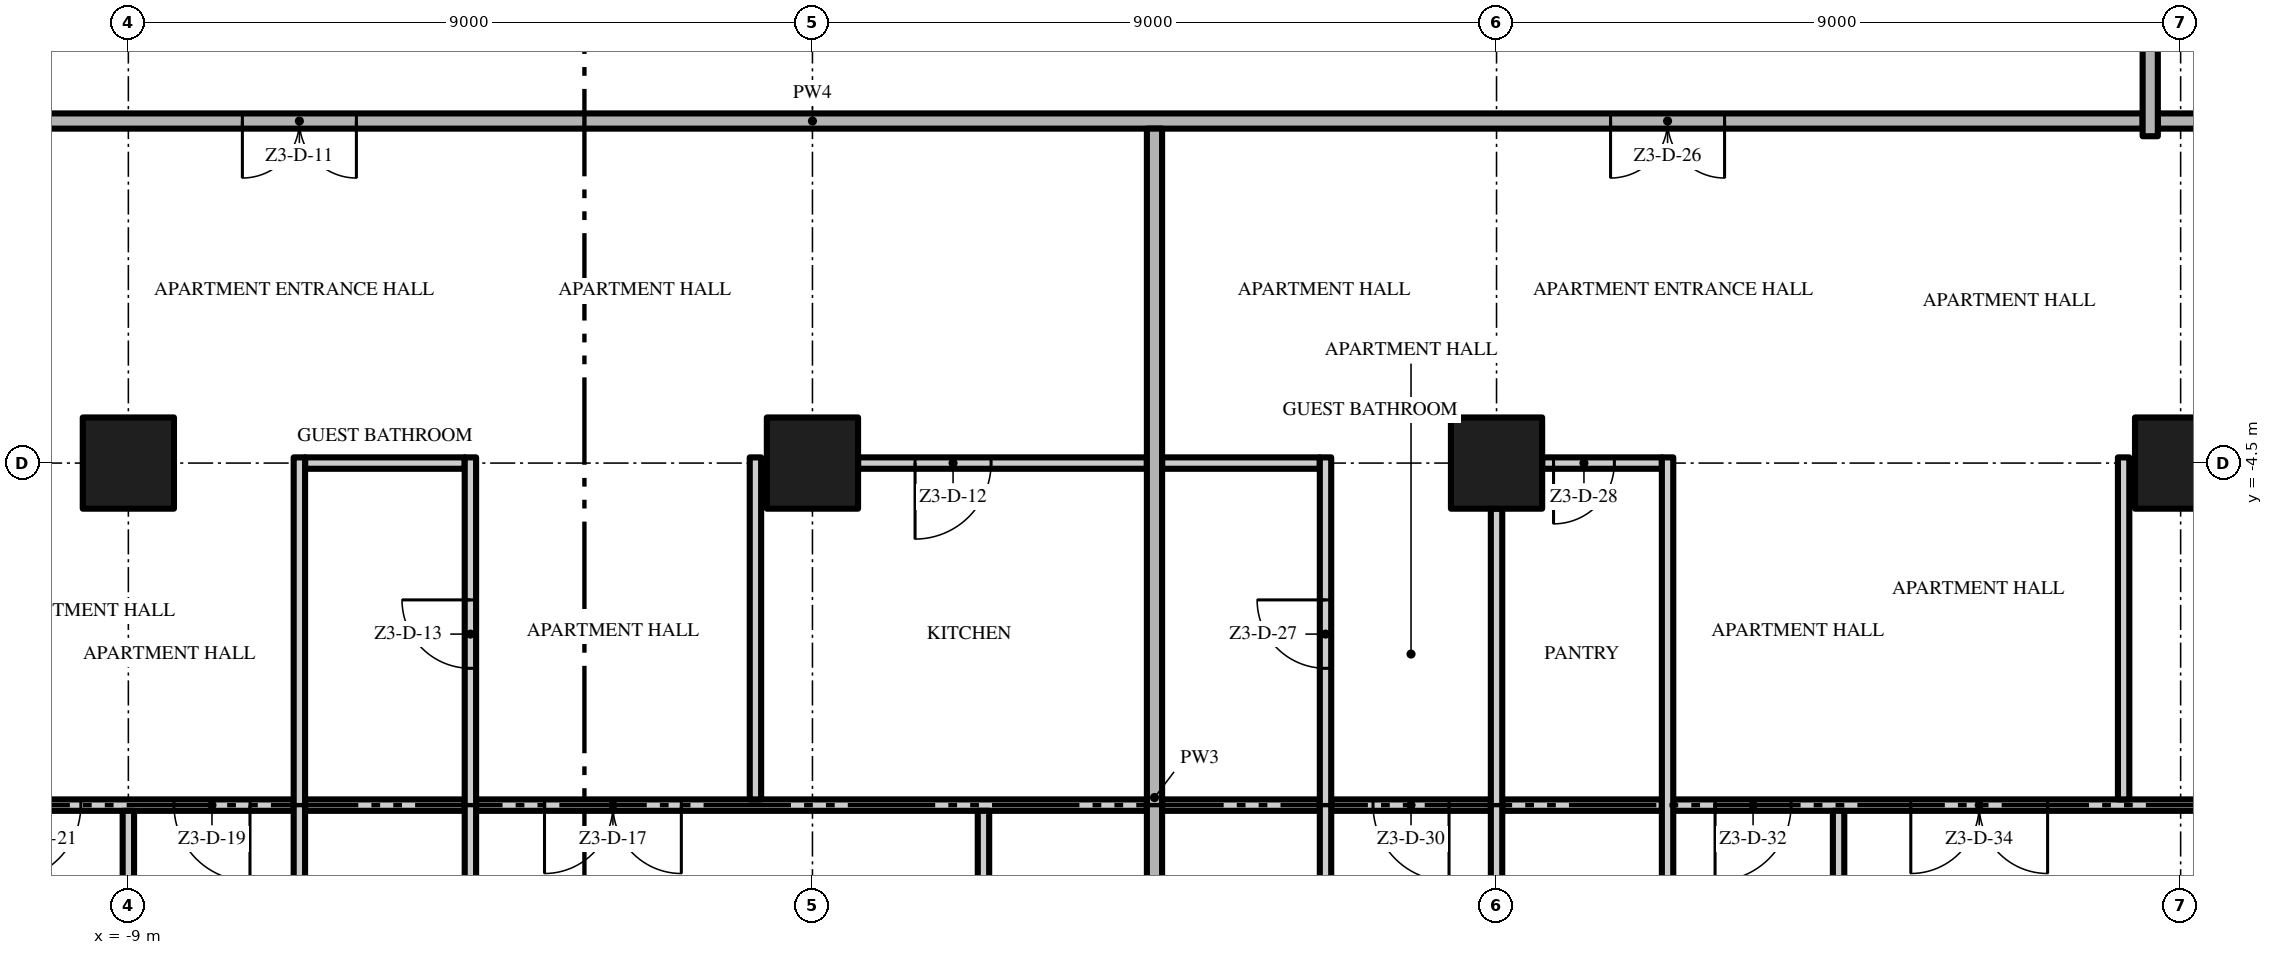
"""IFC4 building model, lengths in metres.
Left out: names, types, materials, properties, quantities, classifications, styles, units other than length and angle.
Written with IfcOpenShell. Run it as: python <this file> out.ifc"""

import sys

from ifc_helpers import new_model, si_unit, direction, frame, frame_2d, origin, origin_2d, place, context, subcontext, project, spatial, rectangle, extrude, element, fill, save


model = new_model("IFC4")
c1 = context("Model", 3, precision=1e-05, world=origin(), true_north=direction((0.0, 1.0)))
c2 = subcontext(c1, "Body", "Model", "MODEL_VIEW")
j1 = project(units=[si_unit("LENGTHUNIT", "METRE"), si_unit("PLANEANGLEUNIT", "RADIAN")], contexts=[c1])
p1 = place(None, origin())
s1 = spatial("IfcSite", under=j1, at=p1, CompositionType="ELEMENT")
p2 = place(p1, origin())
s2 = spatial("IfcBuilding", under=s1, at=p2, CompositionType="ELEMENT")
p3 = place(p2, frame((0.0, 0.0, 159.2)))
s3 = spatial("IfcBuildingStorey", under=s2, at=p3, CompositionType="ELEMENT", Elevation=159.2)
for number, where, z_axis, x_axis in (
    (1, (-9.0, -4.5, 0.0), (0.0, 0.0, 1.0), (1.0, 0.0, 0.0)),
    (2, (0.0, -4.5, 0.0), (0.0, 0.0, 1.0), (1.0, 0.0, 0.0)),
    (3, (18.0, -4.5, 0.0), (0.0, 0.0, 1.0), (1.0, 0.0, 0.0)),
    (4, (9.0, -4.5, 0.0), (0.0, 0.0, 1.0), (1.0, 0.0, 0.0)),
):
    element("IfcColumn", number, at=place(p3, frame(where, z_axis=z_axis, x_axis=x_axis)), inside=s3, PredefinedType="COLUMN", context=c2, shape_type="SweptSolid", body=[
        extrude(rectangle(XDim=1.2, YDim=1.2, at=origin_2d()), origin(), (0.0, 0.0, 1.0), 3.5),
    ])
p4 = place(p3, frame((-6.825, -9.0, 0.0), z_axis=(0.0, 0.0, 1.0), x_axis=(-1.0, 0.0, 0.0)))
e5 = element("IfcWall", 5, at=p4, inside=s3, PredefinedType="PARTITIONING", context=c2, shape_type="SweptSolid", body=[
    extrude(rectangle(XDim=4.35, YDim=0.15, at=frame_2d((2.175, 0.0))), origin(), (0.0, 0.0, 1.0), 3.5),
])
p5 = place(p4, frame((0.575, 0.0, 0.0)))
e6 = element("IfcOpeningElement", 6, at=p5, cuts=e5, PredefinedType="OPENING", context=c2, shape_type="SweptSolid", body=[
    extrude(rectangle(XDim=1.0, YDim=2.4, at=frame_2d((0.5, 1.2))), frame((0.0, 0.085, 0.0), z_axis=(0.0, -1.0, 0.0), x_axis=(1.0, 0.0, 0.0)), (0.0, 0.0, 1.0), 0.17),
])
p6 = place(p4, frame((2.8, 0.0, 0.0)))
e7 = element("IfcOpeningElement", 7, at=p6, cuts=e5, PredefinedType="OPENING", context=c2, shape_type="SweptSolid", body=[
    extrude(rectangle(XDim=1.0, YDim=2.4, at=frame_2d((0.5, 1.2))), frame((0.0, 0.085, 0.0), z_axis=(0.0, -1.0, 0.0), x_axis=(1.0, 0.0, 0.0)), (0.0, 0.0, 1.0), 0.17),
])
p7 = place(p3, frame((-6.675, -9.0, 0.0), z_axis=(0.0, 0.0, 1.0), x_axis=(1.0, 0.0, 0.0)))
e8 = element("IfcWall", 8, at=p7, inside=s3, PredefinedType="PARTITIONING", context=c2, shape_type="SweptSolid", body=[
    extrude(rectangle(XDim=2.1, YDim=0.15, at=frame_2d((1.05, 0.0))), origin(), (0.0, 0.0, 1.0), 3.5),
])
p8 = place(p3, frame((4.4, -9.0, 0.0), z_axis=(0.0, 0.0, 1.0), x_axis=(-1.0, 0.0, 0.0)))
e9 = element("IfcWall", 9, at=p8, inside=s3, PredefinedType="PARTITIONING", context=c2, shape_type="SweptSolid", body=[
    extrude(rectangle(XDim=8.825, YDim=0.15, at=frame_2d((4.412, 0.0))), origin(), (0.0, 0.0, 1.0), 3.5),
])
p9 = place(p8, frame((6.125, 0.0, 0.0)))
e10 = element("IfcOpeningElement", 10, at=p9, cuts=e9, PredefinedType="OPENING", context=c2, shape_type="SweptSolid", body=[
    extrude(rectangle(XDim=1.8, YDim=2.4, at=frame_2d((0.9, 1.2))), frame((0.0, 0.085, 0.0), z_axis=(0.0, -1.0, 0.0), x_axis=(1.0, 0.0, 0.0)), (0.0, 0.0, 1.0), 0.17),
])
p10 = place(p3, frame((4.6, -9.0, 0.0), z_axis=(0.0, 0.0, 1.0), x_axis=(1.0, 0.0, 0.0)))
e11 = element("IfcWall", 11, at=p10, inside=s3, PredefinedType="PARTITIONING", context=c2, shape_type="SweptSolid", body=[
    extrude(rectangle(XDim=2.075, YDim=0.15, at=frame_2d((1.038, 0.0))), origin(), (0.0, 0.0, 1.0), 3.5),
])
p11 = place(p3, frame((8.925, -9.0, 0.0), z_axis=(0.0, 0.0, 1.0), x_axis=(-1.0, 0.0, 0.0)))
e12 = element("IfcWall", 12, at=p11, inside=s3, PredefinedType="PARTITIONING", context=c2, shape_type="SweptSolid", body=[
    extrude(rectangle(XDim=2.1, YDim=0.15, at=frame_2d((1.05, 0.0))), origin(), (0.0, 0.0, 1.0), 3.5),
])
p12 = place(p11, frame((0.55, 0.0, 0.0)))
e13 = element("IfcOpeningElement", 13, at=p12, cuts=e12, PredefinedType="OPENING", context=c2, shape_type="SweptSolid", body=[
    extrude(rectangle(XDim=1.0, YDim=2.4, at=frame_2d((0.5, 1.2))), frame((0.0, 0.085, 0.0), z_axis=(0.0, -1.0, 0.0), x_axis=(1.0, 0.0, 0.0)), (0.0, 0.0, 1.0), 0.17),
])
p13 = place(p3, frame((9.075, -9.0, 0.0), z_axis=(0.0, 0.0, 1.0), x_axis=(1.0, 0.0, 0.0)))
e14 = element("IfcWall", 14, at=p13, inside=s3, PredefinedType="PARTITIONING", context=c2, shape_type="SweptSolid", body=[
    extrude(rectangle(XDim=2.1, YDim=0.15, at=frame_2d((1.05, 0.0))), origin(), (0.0, 0.0, 1.0), 3.5),
])
p14 = place(p3, frame((22.2, -9.0, 0.0), z_axis=(0.0, 0.0, 1.0), x_axis=(-1.0, 0.0, 0.0)))
e15 = element("IfcWall", 15, at=p14, inside=s3, PredefinedType="PARTITIONING", context=c2, shape_type="SweptSolid", body=[
    extrude(rectangle(XDim=10.875, YDim=0.15, at=frame_2d((5.438, 0.0))), origin(), (0.0, 0.0, 1.0), 3.5),
])
p15 = place(p14, frame((9.325, 0.0, 0.0)))
e16 = element("IfcOpeningElement", 16, at=p15, cuts=e15, PredefinedType="OPENING", context=c2, shape_type="SweptSolid", body=[
    extrude(rectangle(XDim=1.0, YDim=2.4, at=frame_2d((0.5, 1.2))), frame((0.0, 0.085, 0.0), z_axis=(0.0, -1.0, 0.0), x_axis=(1.0, 0.0, 0.0)), (0.0, 0.0, 1.0), 0.17),
])
p16 = place(p14, frame((5.95, 0.0, 0.0)))
e17 = element("IfcOpeningElement", 17, at=p16, cuts=e15, PredefinedType="OPENING", context=c2, shape_type="SweptSolid", body=[
    extrude(rectangle(XDim=1.8, YDim=2.4, at=frame_2d((0.9, 1.2))), frame((0.0, 0.085, 0.0), z_axis=(0.0, -1.0, 0.0), x_axis=(1.0, 0.0, 0.0)), (0.0, 0.0, 1.0), 0.17),
])
p17 = place(p3, frame((-6.675, -4.5, 0.0), z_axis=(0.0, 0.0, 1.0), x_axis=(1.0, 0.0, 0.0)))
e18 = element("IfcWall", 18, at=p17, inside=s3, PredefinedType="PARTITIONING", context=c2, shape_type="SweptSolid", body=[
    extrude(rectangle(XDim=2.1, YDim=0.15, at=frame_2d((1.05, 0.0))), origin(), (0.0, 0.0, 1.0), 3.5),
])
p18 = place(p3, frame((4.4, -4.5, 0.0), z_axis=(0.0, 0.0, 1.0), x_axis=(-1.0, 0.0, 0.0)))
e19 = element("IfcWall", 19, at=p18, inside=s3, PredefinedType="PARTITIONING", context=c2, shape_type="SweptSolid", body=[
    extrude(rectangle(XDim=3.8, YDim=0.15, at=frame_2d((1.9, 0.0))), origin(), (0.0, 0.0, 1.0), 3.5),
])
p19 = place(p18, frame((2.05, 0.0, 0.0)))
e20 = element("IfcOpeningElement", 20, at=p19, cuts=e19, PredefinedType="OPENING", context=c2, shape_type="SweptSolid", body=[
    extrude(rectangle(XDim=1.0, YDim=2.4, at=frame_2d((0.5, 1.2))), frame((0.0, 0.085, 0.0), z_axis=(0.0, -1.0, 0.0), x_axis=(1.0, 0.0, 0.0)), (0.0, 0.0, 1.0), 0.17),
])
p20 = place(p3, frame((4.6, -4.5, 0.0), z_axis=(0.0, 0.0, 1.0), x_axis=(1.0, 0.0, 0.0)))
e21 = element("IfcWall", 21, at=p20, inside=s3, PredefinedType="PARTITIONING", context=c2, shape_type="SweptSolid", body=[
    extrude(rectangle(XDim=2.075, YDim=0.15, at=frame_2d((1.038, 0.0))), origin(), (0.0, 0.0, 1.0), 3.5),
])
p21 = place(p3, frame((11.175, -4.5, 0.0), z_axis=(0.0, 0.0, 1.0), x_axis=(-1.0, 0.0, 0.0)))
e22 = element("IfcWall", 22, at=p21, inside=s3, PredefinedType="PARTITIONING", context=c2, shape_type="SweptSolid", body=[
    extrude(rectangle(XDim=1.575, YDim=0.15, at=frame_2d((0.787, 0.0))), origin(), (0.0, 0.0, 1.0), 3.5),
])
p22 = place(p21, frame((0.625, 0.0, 0.0)))
e23 = element("IfcOpeningElement", 23, at=p22, cuts=e22, PredefinedType="OPENING", context=c2, shape_type="SweptSolid", body=[
    extrude(rectangle(XDim=0.8, YDim=2.0, at=frame_2d((0.4, 1.0))), frame((0.0, 0.085, 0.0), z_axis=(0.0, -1.0, 0.0), x_axis=(1.0, 0.0, 0.0)), (0.0, 0.0, 1.0), 0.17),
])
p23 = place(p3, frame((17.5, 0.0, 0.0), z_axis=(0.0, 0.0, 1.0), x_axis=(-1.0, 0.0, 0.0)))
e24 = element("IfcWall", 24, at=p23, inside=s3, PredefinedType="PARTITIONING", context=c2, shape_type="SweptSolid", body=[
    extrude(rectangle(XDim=35.0, YDim=0.2, at=frame_2d((17.5, 0.0))), origin(), (0.0, 0.0, 1.0), 3.5),
])
p24 = place(p23, frame((23.5, 0.0, 0.0)))
e25 = element("IfcOpeningElement", 25, at=p24, cuts=e24, PredefinedType="OPENING", context=c2, shape_type="SweptSolid", body=[
    extrude(rectangle(XDim=1.5, YDim=2.4, at=frame_2d((0.75, 1.2))), frame((0.0, 0.11, 0.0), z_axis=(0.0, -1.0, 0.0), x_axis=(1.0, 0.0, 0.0)), (0.0, 0.0, 1.0), 0.22),
])
p25 = place(p23, frame((5.5, 0.0, 0.0)))
e26 = element("IfcOpeningElement", 26, at=p25, cuts=e24, PredefinedType="OPENING", context=c2, shape_type="SweptSolid", body=[
    extrude(rectangle(XDim=1.5, YDim=2.4, at=frame_2d((0.75, 1.2))), frame((0.0, 0.11, 0.0), z_axis=(0.0, -1.0, 0.0), x_axis=(1.0, 0.0, 0.0)), (0.0, 0.0, 1.0), 0.22),
])
p26 = place(p3, frame((17.7, 0.0, 0.0), z_axis=(0.0, 0.0, 1.0), x_axis=(1.0, 0.0, 0.0)))
e27 = element("IfcWall", 27, at=p26, inside=s3, PredefinedType="PARTITIONING", context=c2, shape_type="SweptSolid", body=[
    extrude(rectangle(XDim=4.5, YDim=0.2, at=frame_2d((2.25, 0.0))), origin(), (0.0, 0.0, 1.0), 3.5),
])
p27 = place(p3, frame((-9.0, -12.9, 0.0), z_axis=(0.0, 0.0, 1.0), x_axis=(0.0, 1.0, 0.0)))
e28 = element("IfcWall", 28, at=p27, inside=s3, PredefinedType="PARTITIONING", context=c2, shape_type="SweptSolid", body=[
    extrude(rectangle(XDim=3.825, YDim=0.15, at=frame_2d((1.913, 0.0))), origin(), (0.0, 0.0, 1.0), 3.5),
])
p28 = place(p3, frame((-6.75, -12.075, 0.0), z_axis=(0.0, 0.0, 1.0), x_axis=(0.0, 1.0, 0.0)))
e29 = element("IfcWall", 29, at=p28, inside=s3, PredefinedType="PARTITIONING", context=c2, shape_type="SweptSolid", body=[
    extrude(rectangle(XDim=7.65, YDim=0.15, at=frame_2d((3.825, 0.0))), origin(), (0.0, 0.0, 1.0), 3.5),
])
p29 = place(p3, frame((-4.5, -17.7, 0.0), z_axis=(0.0, 0.0, 1.0), x_axis=(0.0, 1.0, 0.0)))
e30 = element("IfcWall", 30, at=p29, inside=s3, PredefinedType="PARTITIONING", context=c2, shape_type="SweptSolid", body=[
    extrude(rectangle(XDim=13.275, YDim=0.15, at=frame_2d((6.638, 0.0))), origin(), (0.0, 0.0, 1.0), 3.5),
])
p30 = place(p29, frame((10.5, 0.0, 0.0)))
e31 = element("IfcOpeningElement", 31, at=p30, cuts=e30, PredefinedType="OPENING", context=c2, shape_type="SweptSolid", body=[
    extrude(rectangle(XDim=0.9, YDim=2.1, at=frame_2d((0.45, 1.05))), frame((0.0, 0.085, 0.0), z_axis=(0.0, -1.0, 0.0), x_axis=(1.0, 0.0, 0.0)), (0.0, 0.0, 1.0), 0.17),
])
p31 = place(p3, frame((-0.75, -8.925, 0.0), z_axis=(0.0, 0.0, 1.0), x_axis=(0.0, 1.0, 0.0)))
e32 = element("IfcWall", 32, at=p31, inside=s3, PredefinedType="PARTITIONING", context=c2, shape_type="SweptSolid", body=[
    extrude(rectangle(XDim=4.5, YDim=0.15, at=frame_2d((2.25, 0.0))), origin(), (0.0, 0.0, 1.0), 3.5),
])
p32 = place(p3, frame((2.25, -12.075, 0.0), z_axis=(0.0, 0.0, 1.0), x_axis=(0.0, 1.0, 0.0)))
e33 = element("IfcWall", 33, at=p32, inside=s3, PredefinedType="PARTITIONING", context=c2, shape_type="SweptSolid", body=[
    extrude(rectangle(XDim=3.0, YDim=0.15, at=frame_2d((1.5, 0.0))), origin(), (0.0, 0.0, 1.0), 3.5),
])
p33 = place(p3, frame((4.5, -17.7, 0.0), z_axis=(0.0, 0.0, 1.0), x_axis=(0.0, 1.0, 0.0)))
e34 = element("IfcWall", 34, at=p33, inside=s3, PredefinedType="PARTITIONING", context=c2, shape_type="SweptSolid", body=[
    extrude(rectangle(XDim=17.6, YDim=0.2, at=frame_2d((8.8, 0.0))), origin(), (0.0, 0.0, 1.0), 3.5),
])
p34 = place(p3, frame((6.75, -12.075, 0.0), z_axis=(0.0, 0.0, 1.0), x_axis=(0.0, 1.0, 0.0)))
e35 = element("IfcWall", 35, at=p34, inside=s3, PredefinedType="PARTITIONING", context=c2, shape_type="SweptSolid", body=[
    extrude(rectangle(XDim=7.65, YDim=0.15, at=frame_2d((3.825, 0.0))), origin(), (0.0, 0.0, 1.0), 3.5),
])
p35 = place(p34, frame((4.875, 0.0, 0.0)))
e36 = element("IfcOpeningElement", 36, at=p35, cuts=e35, PredefinedType="OPENING", context=c2, shape_type="SweptSolid", body=[
    extrude(rectangle(XDim=0.9, YDim=2.1, at=frame_2d((0.45, 1.05))), frame((0.0, 0.085, 0.0), z_axis=(0.0, -1.0, 0.0), x_axis=(1.0, 0.0, 0.0)), (0.0, 0.0, 1.0), 0.17),
])
p36 = place(p34, frame((1.125, 0.0, 0.0)))
e37 = element("IfcOpeningElement", 37, at=p36, cuts=e35, PredefinedType="OPENING", context=c2, shape_type="SweptSolid", body=[
    extrude(rectangle(XDim=0.9, YDim=2.1, at=frame_2d((0.45, 1.05))), frame((0.0, 0.085, 0.0), z_axis=(0.0, -1.0, 0.0), x_axis=(1.0, 0.0, 0.0)), (0.0, 0.0, 1.0), 0.17),
])
p37 = place(p3, frame((9.0, -12.9, 0.0), z_axis=(0.0, 0.0, 1.0), x_axis=(0.0, 1.0, 0.0)))
e38 = element("IfcWall", 38, at=p37, inside=s3, PredefinedType="PARTITIONING", context=c2, shape_type="SweptSolid", body=[
    extrude(rectangle(XDim=7.8, YDim=0.15, at=frame_2d((3.9, 0.0))), origin(), (0.0, 0.0, 1.0), 3.5),
])
p38 = place(p3, frame((11.25, -12.075, 0.0), z_axis=(0.0, 0.0, 1.0), x_axis=(0.0, 1.0, 0.0)))
e39 = element("IfcWall", 39, at=p38, inside=s3, PredefinedType="PARTITIONING", context=c2, shape_type="SweptSolid", body=[
    extrude(rectangle(XDim=7.65, YDim=0.15, at=frame_2d((3.825, 0.0))), origin(), (0.0, 0.0, 1.0), 3.5),
])
p39 = place(p3, frame((13.5, -17.7, 0.0), z_axis=(0.0, 0.0, 1.0), x_axis=(0.0, 1.0, 0.0)))
e40 = element("IfcWall", 40, at=p39, inside=s3, PredefinedType="PARTITIONING", context=c2, shape_type="SweptSolid", body=[
    extrude(rectangle(XDim=8.625, YDim=0.15, at=frame_2d((4.312, 0.0))), origin(), (0.0, 0.0, 1.0), 3.5),
])
p40 = place(p3, frame((17.25, -8.925, 0.0), z_axis=(0.0, 0.0, 1.0), x_axis=(0.0, 1.0, 0.0)))
e41 = element("IfcWall", 41, at=p40, inside=s3, PredefinedType="PARTITIONING", context=c2, shape_type="SweptSolid", body=[
    extrude(rectangle(XDim=4.5, YDim=0.15, at=frame_2d((2.25, 0.0))), origin(), (0.0, 0.0, 1.0), 3.5),
])
p41 = place(p3, frame((17.6, -0.2, 0.0), z_axis=(0.0, 0.0, 1.0), x_axis=(0.0, 1.0, 0.0)))
e42 = element("IfcWall", 42, at=p41, inside=s3, PredefinedType="PARTITIONING", context=c2, shape_type="SweptSolid", body=[
    extrude(rectangle(XDim=4.1, YDim=0.2, at=frame_2d((2.05, 0.0))), origin(), (0.0, 0.0, 1.0), 3.5),
])
p42 = place(p24, origin())
e43 = element("IfcDoor", 43, at=p42, inside=s3, OperationType="DOUBLE_DOOR_SINGLE_SWING", PredefinedType="DOOR", context=c2, shape_type="SweptSolid", body=[
    extrude(rectangle(XDim=1.5, YDim=2.4, at=frame_2d((0.75, 1.2))), frame((0.0, 0.025, 0.0), z_axis=(0.0, -1.0, 0.0), x_axis=(1.0, 0.0, 0.0)), (0.0, 0.0, 1.0), 0.05),
])
fill(e25, e43)
p43 = place(p19, origin())
e44 = element("IfcDoor", 44, at=p43, inside=s3, OperationType="SINGLE_SWING_RIGHT", PredefinedType="DOOR", context=c2, shape_type="SweptSolid", body=[
    extrude(rectangle(XDim=1.0, YDim=2.4, at=frame_2d((0.5, 1.2))), frame((0.0, 0.025, 0.0), z_axis=(0.0, -1.0, 0.0), x_axis=(1.0, 0.0, 0.0)), (0.0, 0.0, 1.0), 0.05),
])
fill(e20, e44)
p44 = place(p30, origin())
e45 = element("IfcDoor", 45, at=p44, inside=s3, OperationType="SINGLE_SWING_RIGHT", PredefinedType="DOOR", context=c2, shape_type="SweptSolid", body=[
    extrude(rectangle(XDim=0.9, YDim=2.1, at=frame_2d((0.45, 1.05))), frame((0.0, 0.025, 0.0), z_axis=(0.0, -1.0, 0.0), x_axis=(1.0, 0.0, 0.0)), (0.0, 0.0, 1.0), 0.05),
])
fill(e31, e45)
p45 = place(p9, origin())
e46 = element("IfcDoor", 46, at=p45, inside=s3, OperationType="DOUBLE_DOOR_SINGLE_SWING", PredefinedType="DOOR", context=c2, shape_type="SweptSolid", body=[
    extrude(rectangle(XDim=1.8, YDim=2.4, at=frame_2d((0.9, 1.2))), frame((0.0, 0.025, 0.0), z_axis=(0.0, -1.0, 0.0), x_axis=(1.0, 0.0, 0.0)), (0.0, 0.0, 1.0), 0.05),
])
fill(e10, e46)
p46 = place(p5, origin())
e47 = element("IfcDoor", 47, at=p46, inside=s3, OperationType="SINGLE_SWING_LEFT", PredefinedType="DOOR", context=c2, shape_type="SweptSolid", body=[
    extrude(rectangle(XDim=1.0, YDim=2.4, at=frame_2d((0.5, 1.2))), frame((0.0, 0.025, 0.0), z_axis=(0.0, -1.0, 0.0), x_axis=(1.0, 0.0, 0.0)), (0.0, 0.0, 1.0), 0.05),
])
fill(e6, e47)
p47 = place(p6, origin())
e48 = element("IfcDoor", 48, at=p47, inside=s3, OperationType="SINGLE_SWING_RIGHT", PredefinedType="DOOR", context=c2, shape_type="SweptSolid", body=[
    extrude(rectangle(XDim=1.0, YDim=2.4, at=frame_2d((0.5, 1.2))), frame((0.0, 0.025, 0.0), z_axis=(0.0, -1.0, 0.0), x_axis=(1.0, 0.0, 0.0)), (0.0, 0.0, 1.0), 0.05),
])
fill(e7, e48)
p48 = place(p25, origin())
e49 = element("IfcDoor", 49, at=p48, inside=s3, OperationType="DOUBLE_DOOR_SINGLE_SWING", PredefinedType="DOOR", context=c2, shape_type="SweptSolid", body=[
    extrude(rectangle(XDim=1.5, YDim=2.4, at=frame_2d((0.75, 1.2))), frame((0.0, 0.025, 0.0), z_axis=(0.0, -1.0, 0.0), x_axis=(1.0, 0.0, 0.0)), (0.0, 0.0, 1.0), 0.05),
])
fill(e26, e49)
p49 = place(p35, origin())
e50 = element("IfcDoor", 50, at=p49, inside=s3, OperationType="SINGLE_SWING_RIGHT", PredefinedType="DOOR", context=c2, shape_type="SweptSolid", body=[
    extrude(rectangle(XDim=0.9, YDim=2.1, at=frame_2d((0.45, 1.05))), frame((0.0, 0.025, 0.0), z_axis=(0.0, -1.0, 0.0), x_axis=(1.0, 0.0, 0.0)), (0.0, 0.0, 1.0), 0.05),
])
fill(e36, e50)
p50 = place(p22, origin())
e51 = element("IfcDoor", 51, at=p50, inside=s3, OperationType="SINGLE_SWING_RIGHT", PredefinedType="DOOR", context=c2, shape_type="SweptSolid", body=[
    extrude(rectangle(XDim=0.8, YDim=2.0, at=frame_2d((0.4, 1.0))), frame((0.0, 0.025, 0.0), z_axis=(0.0, -1.0, 0.0), x_axis=(1.0, 0.0, 0.0)), (0.0, 0.0, 1.0), 0.05),
])
fill(e23, e51)
p51 = place(p12, origin())
e52 = element("IfcDoor", 52, at=p51, inside=s3, OperationType="SINGLE_SWING_LEFT", PredefinedType="DOOR", context=c2, shape_type="SweptSolid", body=[
    extrude(rectangle(XDim=1.0, YDim=2.4, at=frame_2d((0.5, 1.2))), frame((0.0, 0.025, 0.0), z_axis=(0.0, -1.0, 0.0), x_axis=(1.0, 0.0, 0.0)), (0.0, 0.0, 1.0), 0.05),
])
fill(e13, e52)
p52 = place(p15, origin())
e53 = element("IfcDoor", 53, at=p52, inside=s3, OperationType="SINGLE_SWING_RIGHT", PredefinedType="DOOR", context=c2, shape_type="SweptSolid", body=[
    extrude(rectangle(XDim=1.0, YDim=2.4, at=frame_2d((0.5, 1.2))), frame((0.0, 0.025, 0.0), z_axis=(0.0, -1.0, 0.0), x_axis=(1.0, 0.0, 0.0)), (0.0, 0.0, 1.0), 0.05),
])
fill(e16, e53)
p53 = place(p16, origin())
e54 = element("IfcDoor", 54, at=p53, inside=s3, OperationType="DOUBLE_DOOR_SINGLE_SWING", PredefinedType="DOOR", context=c2, shape_type="SweptSolid", body=[
    extrude(rectangle(XDim=1.8, YDim=2.4, at=frame_2d((0.9, 1.2))), frame((0.0, 0.025, 0.0), z_axis=(0.0, -1.0, 0.0), x_axis=(1.0, 0.0, 0.0)), (0.0, 0.0, 1.0), 0.05),
])
fill(e17, e54)
save(model, sys.argv[1])
